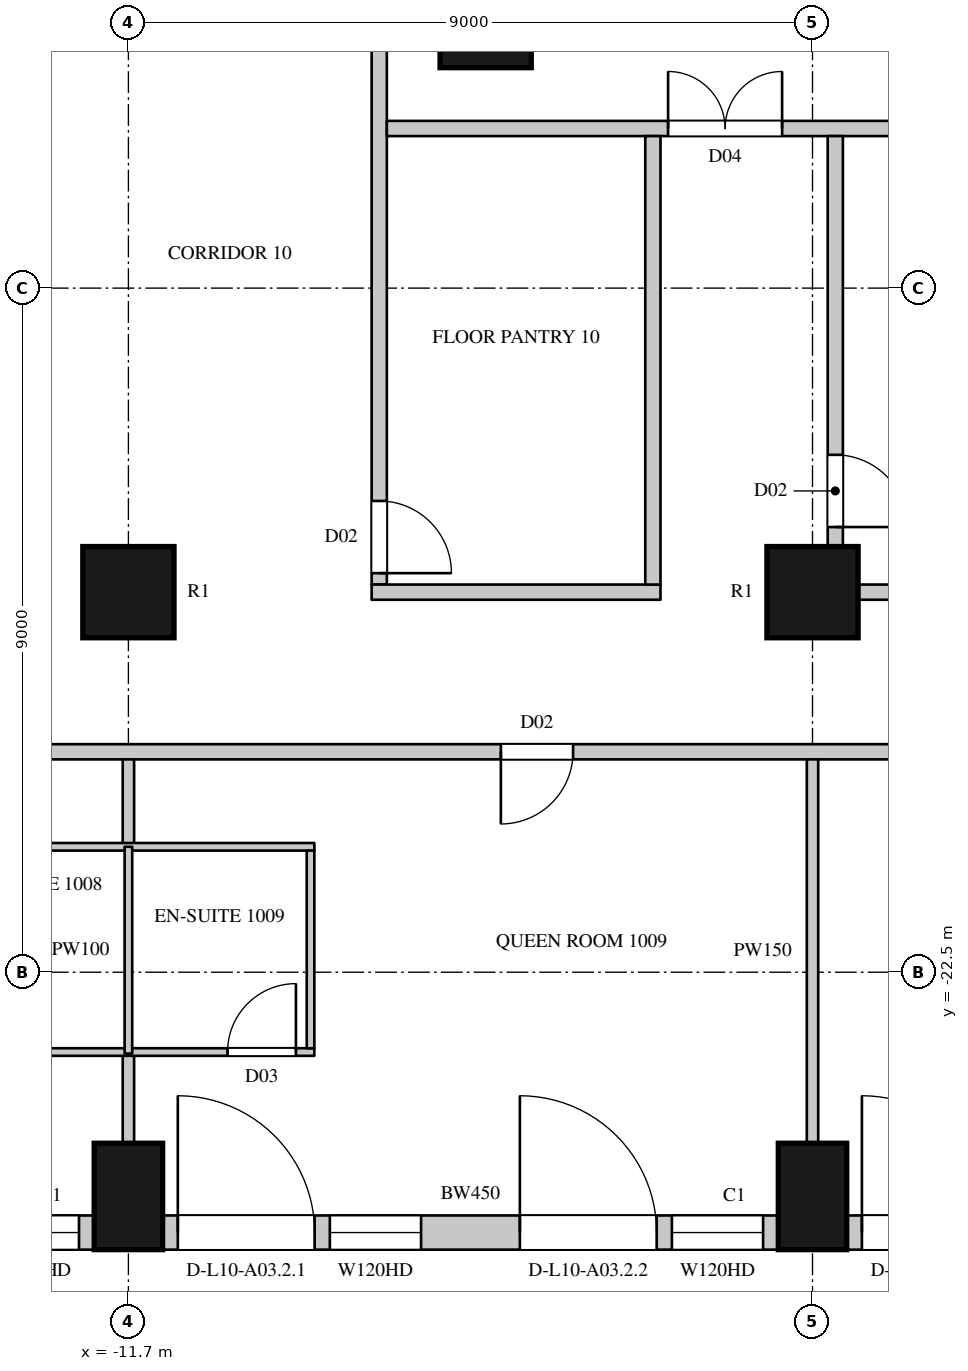
"""IFC4 building model, lengths in metres.
Left out: names, types, materials, properties, quantities, classifications, styles, units other than length and angle.
Written with IfcOpenShell. Run it as: python <this file> out.ifc"""

import sys

from ifc_helpers import new_model, si_unit, direction, frame, frame_2d, origin, origin_2d, place, context, subcontext, project, spatial, rectangle, circle, extrude, element, fill, save


model = new_model("IFC4")
c1 = context("Model", 3, precision=1e-05, world=origin(), true_north=direction((0.0, 1.0)))
c2 = subcontext(c1, "Body", "Model", "MODEL_VIEW")
j1 = project(units=[si_unit("LENGTHUNIT", "METRE"), si_unit("PLANEANGLEUNIT", "RADIAN")], contexts=[c1])
p1 = place(None, origin())
s1 = spatial("IfcSite", under=j1, at=p1, CompositionType="ELEMENT")
p2 = place(p1, origin())
s2 = spatial("IfcBuilding", under=s1, at=p2, CompositionType="ELEMENT")
p3 = place(p2, frame((0.0, 0.0, 66.3)))
s3 = spatial("IfcBuildingStorey", under=s2, at=p3, CompositionType="ELEMENT", Elevation=66.3)
for number, where, z_axis, x_axis in (
    (1, (-11.7, -25.45, 0.0), (0.0, 0.0, 1.0), (1.0, 0.0, 0.0)),
    (2, (-2.7, -25.45, 0.0), (0.0, 0.0, 1.0), (1.0, 0.0, 0.0)),
):
    element("IfcColumn", number, at=place(p3, frame(where, z_axis=z_axis, x_axis=x_axis)), inside=s3, PredefinedType="COLUMN", context=c2, shape_type="SweptSolid", body=[
        extrude(rectangle(XDim=0.9, YDim=1.4, at=origin_2d()), origin(), (0.0, 0.0, 1.0), 3.6),
    ])
for number, where, z_axis, x_axis in (
    (3, (-11.7, -17.5, 0.0), (0.0, 0.0, 1.0), (1.0, 0.0, 0.0)),
    (4, (-2.7, -17.5, 0.0), (0.0, 0.0, 1.0), (1.0, 0.0, 0.0)),
    (5, (-7.0, -10.0, 0.0), (0.0, 0.0, 1.0), (1.0, 0.0, 0.0)),
):
    element("IfcColumn", number, at=place(p3, frame(where, z_axis=z_axis, x_axis=x_axis)), inside=s3, PredefinedType="COLUMN", context=c2, shape_type="SweptSolid", body=[
        extrude(circle(Radius=0.6, at=origin_2d()), origin(), (0.0, 0.0, 1.0), 3.6),
    ])
p4 = place(p3, frame((-20.25, -25.925, 0.0), z_axis=(0.0, 0.0, 1.0), x_axis=(1.0, 0.0, 0.0)))
e6 = element("IfcWall", 6, at=p4, inside=s3, PredefinedType="SOLIDWALL", context=c2, shape_type="SweptSolid", body=[
    extrude(rectangle(XDim=8.1, YDim=0.45, at=frame_2d((4.05, 0.0))), origin(), (0.0, 0.0, 1.0), 3.3),
])
p5 = place(p4, frame((0.2, 0.0, 0.0)))
e7 = element("IfcOpeningElement", 7, at=p5, cuts=e6, PredefinedType="OPENING", context=c2, shape_type="SweptSolid", body=[
    extrude(rectangle(XDim=1.8, YDim=2.4, at=frame_2d((0.9, 1.2))), frame((0.0, 0.235, 0.0), z_axis=(0.0, -1.0, 0.0), x_axis=(1.0, 0.0, 0.0)), (0.0, 0.0, 1.0), 0.47),
])
p6 = place(p4, frame((2.2, 0.0, 1.05)))
e8 = element("IfcOpeningElement", 8, at=p6, cuts=e6, PredefinedType="OPENING", context=c2, shape_type="SweptSolid", body=[
    extrude(rectangle(XDim=1.2, YDim=2.0, at=frame_2d((0.6, 1.0))), frame((0.0, 0.235, 0.0), z_axis=(0.0, -1.0, 0.0), x_axis=(1.0, 0.0, 0.0)), (0.0, 0.0, 1.0), 0.47),
])
p7 = place(p4, frame((4.7, 0.0, 0.0)))
e9 = element("IfcOpeningElement", 9, at=p7, cuts=e6, PredefinedType="OPENING", context=c2, shape_type="SweptSolid", body=[
    extrude(rectangle(XDim=1.8, YDim=2.4, at=frame_2d((0.9, 1.2))), frame((0.0, 0.235, 0.0), z_axis=(0.0, -1.0, 0.0), x_axis=(1.0, 0.0, 0.0)), (0.0, 0.0, 1.0), 0.47),
])
p8 = place(p4, frame((6.7, 0.0, 1.05)))
e10 = element("IfcOpeningElement", 10, at=p8, cuts=e6, PredefinedType="OPENING", context=c2, shape_type="SweptSolid", body=[
    extrude(rectangle(XDim=1.2, YDim=2.0, at=frame_2d((0.6, 1.0))), frame((0.0, 0.235, 0.0), z_axis=(0.0, -1.0, 0.0), x_axis=(1.0, 0.0, 0.0)), (0.0, 0.0, 1.0), 0.47),
])
p9 = place(p3, frame((-11.25, -25.925, 0.0), z_axis=(0.0, 0.0, 1.0), x_axis=(1.0, 0.0, 0.0)))
e11 = element("IfcWall", 11, at=p9, inside=s3, PredefinedType="SOLIDWALL", context=c2, shape_type="SweptSolid", body=[
    extrude(rectangle(XDim=8.1, YDim=0.45, at=frame_2d((4.05, 0.0))), origin(), (0.0, 0.0, 1.0), 3.3),
])
p10 = place(p9, frame((0.2, 0.0, 0.0)))
e12 = element("IfcOpeningElement", 12, at=p10, cuts=e11, PredefinedType="OPENING", context=c2, shape_type="SweptSolid", body=[
    extrude(rectangle(XDim=1.8, YDim=2.4, at=frame_2d((0.9, 1.2))), frame((0.0, 0.235, 0.0), z_axis=(0.0, -1.0, 0.0), x_axis=(1.0, 0.0, 0.0)), (0.0, 0.0, 1.0), 0.47),
])
p11 = place(p9, frame((2.2, 0.0, 1.05)))
e13 = element("IfcOpeningElement", 13, at=p11, cuts=e11, PredefinedType="OPENING", context=c2, shape_type="SweptSolid", body=[
    extrude(rectangle(XDim=1.2, YDim=2.0, at=frame_2d((0.6, 1.0))), frame((0.0, 0.235, 0.0), z_axis=(0.0, -1.0, 0.0), x_axis=(1.0, 0.0, 0.0)), (0.0, 0.0, 1.0), 0.47),
])
p12 = place(p9, frame((4.7, 0.0, 0.0)))
e14 = element("IfcOpeningElement", 14, at=p12, cuts=e11, PredefinedType="OPENING", context=c2, shape_type="SweptSolid", body=[
    extrude(rectangle(XDim=1.8, YDim=2.4, at=frame_2d((0.9, 1.2))), frame((0.0, 0.235, 0.0), z_axis=(0.0, -1.0, 0.0), x_axis=(1.0, 0.0, 0.0)), (0.0, 0.0, 1.0), 0.47),
])
p13 = place(p9, frame((6.7, 0.0, 1.05)))
e15 = element("IfcOpeningElement", 15, at=p13, cuts=e11, PredefinedType="OPENING", context=c2, shape_type="SweptSolid", body=[
    extrude(rectangle(XDim=1.2, YDim=2.0, at=frame_2d((0.6, 1.0))), frame((0.0, 0.235, 0.0), z_axis=(0.0, -1.0, 0.0), x_axis=(1.0, 0.0, 0.0)), (0.0, 0.0, 1.0), 0.47),
])
p14 = place(p3, frame((-2.25, -25.925, 0.0), z_axis=(0.0, 0.0, 1.0), x_axis=(1.0, 0.0, 0.0)))
e16 = element("IfcWall", 16, at=p14, inside=s3, PredefinedType="SOLIDWALL", context=c2, shape_type="SweptSolid", body=[
    extrude(rectangle(XDim=8.1, YDim=0.45, at=frame_2d((4.05, 0.0))), origin(), (0.0, 0.0, 1.0), 3.3),
])
p15 = place(p14, frame((0.2, 0.0, 0.0)))
e17 = element("IfcOpeningElement", 17, at=p15, cuts=e16, PredefinedType="OPENING", context=c2, shape_type="SweptSolid", body=[
    extrude(rectangle(XDim=1.8, YDim=2.4, at=frame_2d((0.9, 1.2))), frame((0.0, 0.235, 0.0), z_axis=(0.0, -1.0, 0.0), x_axis=(1.0, 0.0, 0.0)), (0.0, 0.0, 1.0), 0.47),
])
p16 = place(p14, frame((2.2, 0.0, 1.05)))
e18 = element("IfcOpeningElement", 18, at=p16, cuts=e16, PredefinedType="OPENING", context=c2, shape_type="SweptSolid", body=[
    extrude(rectangle(XDim=1.2, YDim=2.0, at=frame_2d((0.6, 1.0))), frame((0.0, 0.235, 0.0), z_axis=(0.0, -1.0, 0.0), x_axis=(1.0, 0.0, 0.0)), (0.0, 0.0, 1.0), 0.47),
])
p17 = place(p14, frame((4.7, 0.0, 0.0)))
e19 = element("IfcOpeningElement", 19, at=p17, cuts=e16, PredefinedType="OPENING", context=c2, shape_type="SweptSolid", body=[
    extrude(rectangle(XDim=1.8, YDim=2.4, at=frame_2d((0.9, 1.2))), frame((0.0, 0.235, 0.0), z_axis=(0.0, -1.0, 0.0), x_axis=(1.0, 0.0, 0.0)), (0.0, 0.0, 1.0), 0.47),
])
p18 = place(p14, frame((6.7, 0.0, 1.05)))
e20 = element("IfcOpeningElement", 20, at=p18, cuts=e16, PredefinedType="OPENING", context=c2, shape_type="SweptSolid", body=[
    extrude(rectangle(XDim=1.2, YDim=2.0, at=frame_2d((0.6, 1.0))), frame((0.0, 0.235, 0.0), z_axis=(0.0, -1.0, 0.0), x_axis=(1.0, 0.0, 0.0)), (0.0, 0.0, 1.0), 0.47),
])
p19 = place(p3, frame((-20.7, -19.6, 0.0), z_axis=(0.0, 0.0, 1.0), x_axis=(1.0, 0.0, 0.0)))
e21 = element("IfcWall", 21, at=p19, inside=s3, PredefinedType="PARTITIONING", context=c2, shape_type="SweptSolid", body=[
    extrude(rectangle(XDim=38.825, YDim=0.2, at=frame_2d((19.413, 0.0))), origin(), (0.0, 0.0, 1.0), 3.3),
])
p20 = place(p19, frame((3.15, 0.0, 0.0)))
e22 = element("IfcOpeningElement", 22, at=p20, cuts=e21, PredefinedType="OPENING", context=c2, shape_type="SweptSolid", body=[
    extrude(rectangle(XDim=0.95, YDim=2.2, at=frame_2d((0.475, 1.1))), frame((0.0, 0.11, 0.0), z_axis=(0.0, -1.0, 0.0), x_axis=(1.0, 0.0, 0.0)), (0.0, 0.0, 1.0), 0.22),
])
p21 = place(p19, frame((13.9, 0.0, 0.0)))
e23 = element("IfcOpeningElement", 23, at=p21, cuts=e21, PredefinedType="OPENING", context=c2, shape_type="SweptSolid", body=[
    extrude(rectangle(XDim=0.95, YDim=2.2, at=frame_2d((0.475, 1.1))), frame((0.0, 0.11, 0.0), z_axis=(0.0, -1.0, 0.0), x_axis=(1.0, 0.0, 0.0)), (0.0, 0.0, 1.0), 0.22),
])
p22 = place(p19, frame((21.15, 0.0, 0.0)))
e24 = element("IfcOpeningElement", 24, at=p22, cuts=e21, PredefinedType="OPENING", context=c2, shape_type="SweptSolid", body=[
    extrude(rectangle(XDim=0.95, YDim=2.2, at=frame_2d((0.475, 1.1))), frame((0.0, 0.11, 0.0), z_axis=(0.0, -1.0, 0.0), x_axis=(1.0, 0.0, 0.0)), (0.0, 0.0, 1.0), 0.22),
])
p23 = place(p19, frame((29.75, 0.0, 0.0)))
e25 = element("IfcOpeningElement", 25, at=p23, cuts=e21, PredefinedType="OPENING", context=c2, shape_type="SweptSolid", body=[
    extrude(rectangle(XDim=1.1, YDim=2.4, at=frame_2d((0.55, 1.2))), frame((0.0, 0.11, 0.0), z_axis=(0.0, -1.0, 0.0), x_axis=(1.0, 0.0, 0.0)), (0.0, 0.0, 1.0), 0.22),
])
p24 = place(p3, frame((-8.4, -17.4, 0.0), z_axis=(0.0, 0.0, 1.0), x_axis=(0.0, 1.0, 0.0)))
e26 = element("IfcWall", 26, at=p24, inside=s3, PredefinedType="PARTITIONING", context=c2, shape_type="SweptSolid", body=[
    extrude(rectangle(XDim=34.8, YDim=0.2, at=frame_2d((17.4, 0.0))), origin(), (0.0, 0.0, 1.0), 3.3),
])
p25 = place(p24, frame((21.15, 0.0, 0.0)))
e27 = element("IfcOpeningElement", 27, at=p25, cuts=e26, PredefinedType="OPENING", context=c2, shape_type="SweptSolid", body=[
    extrude(rectangle(XDim=1.5, YDim=2.2, at=frame_2d((0.75, 1.1))), frame((0.0, 0.11, 0.0), z_axis=(0.0, -1.0, 0.0), x_axis=(1.0, 0.0, 0.0)), (0.0, 0.0, 1.0), 0.22),
])
p26 = place(p24, frame((33.75, 0.0, 0.0)))
e28 = element("IfcOpeningElement", 28, at=p26, cuts=e26, PredefinedType="OPENING", context=c2, shape_type="SweptSolid", body=[
    extrude(rectangle(XDim=0.9, YDim=2.2, at=frame_2d((0.45, 1.1))), frame((0.0, 0.11, 0.0), z_axis=(0.0, -1.0, 0.0), x_axis=(1.0, 0.0, 0.0)), (0.0, 0.0, 1.0), 0.22),
])
p27 = place(p24, frame((0.15, 0.0, 0.0)))
e29 = element("IfcOpeningElement", 29, at=p27, cuts=e26, PredefinedType="OPENING", context=c2, shape_type="SweptSolid", body=[
    extrude(rectangle(XDim=0.95, YDim=2.2, at=frame_2d((0.475, 1.1))), frame((0.0, 0.11, 0.0), z_axis=(0.0, -1.0, 0.0), x_axis=(1.0, 0.0, 0.0)), (0.0, 0.0, 1.0), 0.22),
])
p28 = place(p3, frame((-8.5, -17.5, 0.0), z_axis=(0.0, 0.0, 1.0), x_axis=(1.0, 0.0, 0.0)))
e30 = element("IfcWall", 30, at=p28, inside=s3, PredefinedType="PARTITIONING", context=c2, shape_type="SweptSolid", body=[
    extrude(rectangle(XDim=3.8, YDim=0.2, at=frame_2d((1.9, 0.0))), origin(), (0.0, 0.0, 1.0), 2.75),
])
p29 = place(p3, frame((-8.3, -11.4, 0.0), z_axis=(0.0, 0.0, 1.0), x_axis=(1.0, 0.0, 0.0)))
e31 = element("IfcWall", 31, at=p29, inside=s3, PredefinedType="PARTITIONING", context=c2, shape_type="SweptSolid", body=[
    extrude(rectangle(XDim=18.6, YDim=0.2, at=frame_2d((9.3, 0.0))), origin(), (0.0, 0.0, 1.0), 3.3),
])
p30 = place(p29, frame((3.7, 0.0, 0.0)))
e32 = element("IfcOpeningElement", 32, at=p30, cuts=e31, PredefinedType="OPENING", context=c2, shape_type="SweptSolid", body=[
    extrude(rectangle(XDim=1.5, YDim=2.2, at=frame_2d((0.75, 1.1))), frame((0.0, 0.11, 0.0), z_axis=(0.0, -1.0, 0.0), x_axis=(1.0, 0.0, 0.0)), (0.0, 0.0, 1.0), 0.22),
])
p31 = place(p3, frame((-4.8, -17.4, 0.0), z_axis=(0.0, 0.0, 1.0), x_axis=(0.0, 1.0, 0.0)))
e33 = element("IfcWall", 33, at=p31, inside=s3, PredefinedType="PARTITIONING", context=c2, shape_type="SweptSolid", body=[
    extrude(rectangle(XDim=5.9, YDim=0.2, at=frame_2d((2.95, 0.0))), origin(), (0.0, 0.0, 1.0), 3.3),
])
p32 = place(p3, frame((-2.4, -16.943, 0.0), z_axis=(0.0, 0.0, 1.0), x_axis=(0.0, 1.0, 0.0)))
e34 = element("IfcWall", 34, at=p32, inside=s3, PredefinedType="PARTITIONING", context=c2, shape_type="SweptSolid", body=[
    extrude(rectangle(XDim=5.443, YDim=0.2, at=frame_2d((2.722, 0.0))), origin(), (0.0, 0.0, 1.0), 3.3),
])
p33 = place(p32, frame((0.3, 0.0, 0.0)))
e35 = element("IfcOpeningElement", 35, at=p33, cuts=e34, PredefinedType="OPENING", context=c2, shape_type="SweptSolid", body=[
    extrude(rectangle(XDim=0.95, YDim=2.2, at=frame_2d((0.475, 1.1))), frame((0.0, 0.11, 0.0), z_axis=(0.0, -1.0, 0.0), x_axis=(1.0, 0.0, 0.0)), (0.0, 0.0, 1.0), 0.22),
])
p34 = place(p3, frame((-2.1, -17.5, 0.0), z_axis=(0.0, 0.0, 1.0), x_axis=(1.0, 0.0, 0.0)))
e36 = element("IfcWall", 36, at=p34, inside=s3, PredefinedType="PARTITIONING", context=c2, shape_type="SweptSolid", body=[
    extrude(rectangle(XDim=7.8, YDim=0.2, at=frame_2d((3.9, 0.0))), origin(), (0.0, 0.0, 1.0), 2.75),
])
p35 = place(p34, frame((6.6, 0.0, 0.0)))
e37 = element("IfcOpeningElement", 37, at=p35, cuts=e36, PredefinedType="OPENING", context=c2, shape_type="SweptSolid", body=[
    extrude(rectangle(XDim=0.9, YDim=2.2, at=frame_2d((0.45, 1.1))), frame((0.0, 0.11, 0.0), z_axis=(0.0, -1.0, 0.0), x_axis=(1.0, 0.0, 0.0)), (0.0, 0.0, 1.0), 0.22),
])
p36 = place(p3, frame((-11.7, -24.75, 0.0), z_axis=(0.0, 0.0, 1.0), x_axis=(0.0, 1.0, 0.0)))
e38 = element("IfcWall", 38, at=p36, inside=s3, PredefinedType="PARTITIONING", context=c2, shape_type="SweptSolid", body=[
    extrude(rectangle(XDim=1.18, YDim=0.15, at=frame_2d((0.59, 0.0))), origin(), (0.0, 0.0, 1.0), 2.75),
])
p37 = place(p3, frame((-11.7, -20.85, 0.0), z_axis=(0.0, 0.0, 1.0), x_axis=(0.0, 1.0, 0.0)))
e39 = element("IfcWall", 39, at=p37, inside=s3, PredefinedType="PARTITIONING", context=c2, shape_type="SweptSolid", body=[
    extrude(rectangle(XDim=1.15, YDim=0.15, at=frame_2d((0.575, 0.0))), origin(), (0.0, 0.0, 1.0), 2.75),
])
p38 = place(p3, frame((-2.7, -24.75, 0.0), z_axis=(0.0, 0.0, 1.0), x_axis=(0.0, 1.0, 0.0)))
e40 = element("IfcWall", 40, at=p38, inside=s3, PredefinedType="PARTITIONING", context=c2, shape_type="SweptSolid", body=[
    extrude(rectangle(XDim=5.05, YDim=0.15, at=frame_2d((2.525, 0.0))), origin(), (0.0, 0.0, 1.0), 2.75),
])
p39 = place(p3, frame((-14.146, -23.55, 0.0), z_axis=(0.0, 0.0, 1.0), x_axis=(1.0, 0.0, 0.0)))
e41 = element("IfcWall", 41, at=p39, inside=s3, PredefinedType="PARTITIONING", context=c2, shape_type="SweptSolid", body=[
    extrude(rectangle(XDim=4.892, YDim=0.1, at=frame_2d((2.446, 0.0))), origin(), (0.0, 0.0, 1.0), 3.3),
])
p40 = place(p39, frame((3.75, 0.0, 0.0)))
e42 = element("IfcOpeningElement", 42, at=p40, cuts=e41, PredefinedType="OPENING", context=c2, shape_type="SweptSolid", body=[
    extrude(rectangle(XDim=0.9, YDim=2.2, at=frame_2d((0.45, 1.1))), frame((0.0, 0.06, 0.0), z_axis=(0.0, -1.0, 0.0), x_axis=(1.0, 0.0, 0.0)), (0.0, 0.0, 1.0), 0.12),
])
p41 = place(p3, frame((-14.146, -20.85, 0.0), z_axis=(0.0, 0.0, 1.0), x_axis=(1.0, 0.0, 0.0)))
e43 = element("IfcWall", 43, at=p41, inside=s3, PredefinedType="PARTITIONING", context=c2, shape_type="SweptSolid", body=[
    extrude(rectangle(XDim=4.892, YDim=0.1, at=frame_2d((2.446, 0.0))), origin(), (0.0, 0.0, 1.0), 3.3),
])
p42 = place(p3, frame((-11.7, -23.57, 0.0), z_axis=(0.0, 0.0, 1.0), x_axis=(0.0, 1.0, 0.0)))
e44 = element("IfcWall", 44, at=p42, inside=s3, PredefinedType="PARTITIONING", context=c2, shape_type="SweptSolid", body=[
    extrude(rectangle(XDim=2.72, YDim=0.1, at=frame_2d((1.36, 0.0))), origin(), (0.0, 0.0, 1.0), 2.75),
])
p43 = place(p3, frame((-9.304, -23.5, 0.0), z_axis=(0.0, 0.0, 1.0), x_axis=(0.0, 1.0, 0.0)))
e45 = element("IfcWall", 45, at=p43, inside=s3, PredefinedType="PARTITIONING", context=c2, shape_type="SweptSolid", body=[
    extrude(rectangle(XDim=2.6, YDim=0.1, at=frame_2d((1.3, 0.0))), origin(), (0.0, 0.0, 1.0), 3.3),
])
p44 = place(p8, origin())
e46 = element("IfcWindow", 46, at=p44, inside=s3, PartitioningType="SINGLE_PANEL", PredefinedType="WINDOW", context=c2, shape_type="SweptSolid", body=[
    extrude(rectangle(XDim=1.2, YDim=2.0, at=frame_2d((0.6, 1.0))), frame((0.0, 0.135, 0.0), z_axis=(0.0, -1.0, 0.0), x_axis=(1.0, 0.0, 0.0)), (0.0, 0.0, 1.0), 0.06),
])
fill(e10, e46)
p45 = place(p10, origin())
e47 = element("IfcDoor", 47, at=p45, inside=s3, OperationType="SLIDING_TO_LEFT", PredefinedType="DOOR", context=c2, shape_type="SweptSolid", body=[
    extrude(rectangle(XDim=1.8, YDim=2.4, at=frame_2d((0.9, 1.2))), frame((0.0, 0.13, 0.0), z_axis=(0.0, -1.0, 0.0), x_axis=(1.0, 0.0, 0.0)), (0.0, 0.0, 1.0), 0.05),
])
fill(e12, e47)
p46 = place(p11, origin())
e48 = element("IfcWindow", 48, at=p46, inside=s3, PartitioningType="SINGLE_PANEL", PredefinedType="WINDOW", context=c2, shape_type="SweptSolid", body=[
    extrude(rectangle(XDim=1.2, YDim=2.0, at=frame_2d((0.6, 1.0))), frame((0.0, 0.135, 0.0), z_axis=(0.0, -1.0, 0.0), x_axis=(1.0, 0.0, 0.0)), (0.0, 0.0, 1.0), 0.06),
])
fill(e13, e48)
p47 = place(p12, origin())
e49 = element("IfcDoor", 49, at=p47, inside=s3, OperationType="SLIDING_TO_LEFT", PredefinedType="DOOR", context=c2, shape_type="SweptSolid", body=[
    extrude(rectangle(XDim=1.8, YDim=2.4, at=frame_2d((0.9, 1.2))), frame((0.0, 0.13, 0.0), z_axis=(0.0, -1.0, 0.0), x_axis=(1.0, 0.0, 0.0)), (0.0, 0.0, 1.0), 0.05),
])
fill(e14, e49)
p48 = place(p13, origin())
e50 = element("IfcWindow", 50, at=p48, inside=s3, PartitioningType="SINGLE_PANEL", PredefinedType="WINDOW", context=c2, shape_type="SweptSolid", body=[
    extrude(rectangle(XDim=1.2, YDim=2.0, at=frame_2d((0.6, 1.0))), frame((0.0, 0.135, 0.0), z_axis=(0.0, -1.0, 0.0), x_axis=(1.0, 0.0, 0.0)), (0.0, 0.0, 1.0), 0.06),
])
fill(e15, e50)
p49 = place(p15, origin())
e51 = element("IfcDoor", 51, at=p49, inside=s3, OperationType="SLIDING_TO_LEFT", PredefinedType="DOOR", context=c2, shape_type="SweptSolid", body=[
    extrude(rectangle(XDim=1.8, YDim=2.4, at=frame_2d((0.9, 1.2))), frame((0.0, 0.13, 0.0), z_axis=(0.0, -1.0, 0.0), x_axis=(1.0, 0.0, 0.0)), (0.0, 0.0, 1.0), 0.05),
])
fill(e17, e51)
p50 = place(p30, origin())
e52 = element("IfcDoor", 52, at=p50, inside=s3, OperationType="DOUBLE_DOOR_SINGLE_SWING", PredefinedType="DOOR", context=c2, shape_type="SweptSolid", body=[
    extrude(rectangle(XDim=1.5, YDim=2.2, at=frame_2d((0.75, 1.1))), frame((0.0, 0.025, 0.0), z_axis=(0.0, -1.0, 0.0), x_axis=(1.0, 0.0, 0.0)), (0.0, 0.0, 1.0), 0.05),
])
fill(e32, e52)
p51 = place(p27, origin())
e53 = element("IfcDoor", 53, at=p51, inside=s3, OperationType="SINGLE_SWING_RIGHT", PredefinedType="DOOR", context=c2, shape_type="SweptSolid", body=[
    extrude(rectangle(XDim=0.95, YDim=2.2, at=frame_2d((0.475, 1.1))), frame((0.0, 0.025, 0.0), z_axis=(0.0, -1.0, 0.0), x_axis=(1.0, 0.0, 0.0)), (0.0, 0.0, 1.0), 0.05),
])
fill(e29, e53)
p52 = place(p33, origin())
e54 = element("IfcDoor", 54, at=p52, inside=s3, OperationType="SINGLE_SWING_RIGHT", PredefinedType="DOOR", context=c2, shape_type="SweptSolid", body=[
    extrude(rectangle(XDim=0.95, YDim=2.2, at=frame_2d((0.475, 1.1))), frame((0.0, 0.025, 0.0), z_axis=(0.0, -1.0, 0.0), x_axis=(1.0, 0.0, 0.0)), (0.0, 0.0, 1.0), 0.05),
])
fill(e35, e54)
p53 = place(p21, origin())
e55 = element("IfcDoor", 55, at=p53, inside=s3, OperationType="SINGLE_SWING_RIGHT", PredefinedType="DOOR", context=c2, shape_type="SweptSolid", body=[
    extrude(rectangle(XDim=0.95, YDim=2.2, at=frame_2d((0.475, 1.1))), frame((0.0, 0.025, 0.0), z_axis=(0.0, -1.0, 0.0), x_axis=(1.0, 0.0, 0.0)), (0.0, 0.0, 1.0), 0.05),
])
fill(e23, e55)
p54 = place(p40, origin())
e56 = element("IfcDoor", 56, at=p54, inside=s3, OperationType="SINGLE_SWING_RIGHT", PredefinedType="DOOR", context=c2, shape_type="SweptSolid", body=[
    extrude(rectangle(XDim=0.9, YDim=2.2, at=frame_2d((0.45, 1.1))), frame((0.0, 0.025, 0.0), z_axis=(0.0, -1.0, 0.0), x_axis=(1.0, 0.0, 0.0)), (0.0, 0.0, 1.0), 0.05),
])
fill(e42, e56)
save(model, sys.argv[1])
